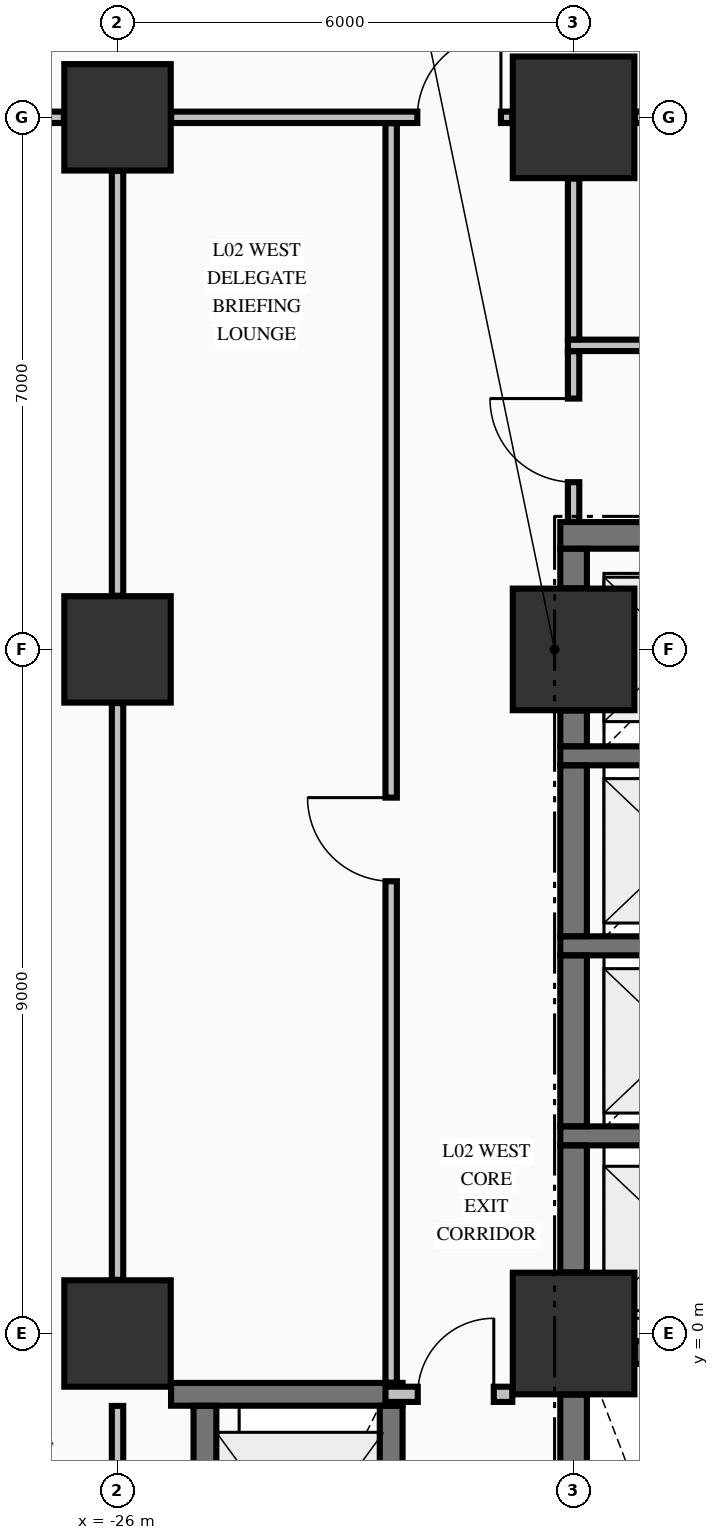
"""IFC4 building model, lengths in metres.
Left out: names, types, materials, properties, quantities, classifications, styles, units other than length and angle.
Written with IfcOpenShell. Run it as: python <this file> out.ifc"""

import sys

from ifc_helpers import new_model, si_unit, direction, frame, frame_2d, origin, origin_2d, place, context, subcontext, project, spatial, rectangle, extrude, element, fill, save


model = new_model("IFC4")
c1 = context("Model", 3, precision=1e-05, world=origin(), true_north=direction((0.0, 1.0)))
c2 = subcontext(c1, "Body", "Model", "MODEL_VIEW")
j1 = project(units=[si_unit("LENGTHUNIT", "METRE"), si_unit("PLANEANGLEUNIT", "RADIAN")], contexts=[c1])
p1 = place(None, origin())
s1 = spatial("IfcSite", under=j1, at=p1, CompositionType="ELEMENT")
p2 = place(p1, origin())
s2 = spatial("IfcBuilding", under=s1, at=p2, CompositionType="ELEMENT")
p3 = place(p2, frame((0.0, 0.0, 10.88)))
s3 = spatial("IfcBuildingStorey", under=s2, at=p3, CompositionType="ELEMENT", Elevation=10.88)
for number, where, z_axis, x_axis in (
    (1, (-26.0, 0.0, 0.0), (0.0, 0.0, 1.0), (1.0, 0.0, 0.0)),
    (2, (-26.0, 9.0, 0.0), (0.0, 0.0, 1.0), (1.0, 0.0, 0.0)),
    (3, (-26.0, 16.0, 0.0), (0.0, 0.0, 1.0), (1.0, 0.0, 0.0)),
):
    element("IfcColumn", number, at=place(p3, frame(where, z_axis=z_axis, x_axis=x_axis)), inside=s3, PredefinedType="COLUMN", context=c2, shape_type="SweptSolid", body=[
        extrude(rectangle(XDim=1.4, YDim=1.4, at=origin_2d()), origin(), (0.0, 0.0, 1.0), 5.09),
    ])
for number, where, z_axis, x_axis in (
    (4, (-20.0, 0.0, 0.0), (0.0, 0.0, 1.0), (1.0, 0.0, 0.0)),
    (5, (-20.0, 9.0, 0.0), (0.0, 0.0, 1.0), (1.0, 0.0, 0.0)),
    (6, (-20.0, 16.0, 0.0), (0.0, 0.0, 1.0), (1.0, 0.0, 0.0)),
):
    element("IfcColumn", number, at=place(p3, frame(where, z_axis=z_axis, x_axis=x_axis)), inside=s3, PredefinedType="COLUMN", context=c2, shape_type="SweptSolid", body=[
        extrude(rectangle(XDim=1.6, YDim=1.6, at=origin_2d()), origin(), (0.0, 0.0, 1.0), 5.09),
    ])
p4 = place(p3, frame((-25.296, -0.8, 0.0), z_axis=(0.0, 0.0, 1.0), x_axis=(1.0, 0.0, 0.0)))
e7 = element("IfcWall", 7, at=p4, inside=s3, PredefinedType="SHEAR", context=c2, shape_type="SweptSolid", body=[
    extrude(rectangle(XDim=3.046, YDim=0.3, at=frame_2d((1.523, 0.0))), origin(), (0.0, 0.0, 1.0), 5.09),
])
p5 = place(p3, frame((-19.196, -0.25, 0.0), z_axis=(0.0, 0.0, 1.0), x_axis=(1.0, 0.0, 0.0)))
e8 = element("IfcWall", 8, at=p5, inside=s3, PredefinedType="SHEAR", context=c2, shape_type="SweptSolid", body=[
    extrude(rectangle(XDim=7.392, YDim=0.3, at=frame_2d((3.696, 0.0))), origin(), (0.0, 0.0, 1.0), 5.09),
])
p6 = place(p5, frame((5.496, 0.0, 0.0)))
e9 = element("IfcOpeningElement", 9, at=p6, cuts=e8, PredefinedType="OPENING", context=c2, shape_type="SweptSolid", body=[
    extrude(rectangle(XDim=1.1, YDim=2.15, at=frame_2d((0.55, 1.075))), frame((0.0, 0.16, 0.0), z_axis=(0.0, -1.0, 0.0), x_axis=(1.0, 0.0, 0.0)), (0.0, 0.0, 1.0), 0.32),
])
for number, where, z_axis, x_axis in (
    (10, (-20.175, 2.6, 0.0), (0.0, 0.0, 1.0), (1.0, 0.0, 0.0)),
    (11, (-20.175, 5.1, 0.0), (0.0, 0.0, 1.0), (1.0, 0.0, 0.0)),
    (12, (-20.175, 7.6, 0.0), (0.0, 0.0, 1.0), (1.0, 0.0, 0.0)),
):
    element("IfcWall", number, at=place(p3, frame(where, z_axis=z_axis, x_axis=x_axis)), inside=s3, PredefinedType="SOLIDWALL", context=c2, shape_type="SweptSolid", body=[
        extrude(rectangle(XDim=3.1, YDim=0.25, at=frame_2d((1.55, 0.0))), origin(), (0.0, 0.0, 1.0), 5.09),
    ])
p7 = place(p3, frame((-20.175, 10.5, 0.0), z_axis=(0.0, 0.0, 1.0), x_axis=(1.0, 0.0, 0.0)))
e13 = element("IfcWall", 13, at=p7, inside=s3, PredefinedType="SHEAR", context=c2, shape_type="SweptSolid", body=[
    extrude(rectangle(XDim=5.475, YDim=0.35, at=frame_2d((2.738, 0.0))), origin(), (0.0, 0.0, 1.0), 5.09),
])
p8 = place(p7, frame((3.575, 0.0, 0.0)))
e14 = element("IfcOpeningElement", 14, at=p8, cuts=e13, PredefinedType="OPENING", context=c2, shape_type="SweptSolid", body=[
    extrude(rectangle(XDim=1.2, YDim=2.15, at=frame_2d((0.6, 1.075))), frame((0.0, 0.185, 0.0), z_axis=(0.0, -1.0, 0.0), x_axis=(1.0, 0.0, 0.0)), (0.0, 0.0, 1.0), 0.37),
])
p9 = place(p3, frame((-22.475, -0.8, 0.0), z_axis=(0.0, 0.0, 1.0), x_axis=(1.0, 0.0, 0.0)))
e15 = element("IfcWall", 15, at=p9, inside=s3, PredefinedType="PARTITIONING", context=c2, shape_type="SweptSolid", body=[
    extrude(rectangle(XDim=1.669, YDim=0.2, at=frame_2d((0.834, 0.0))), origin(), (0.0, 0.0, 1.0), 5.09),
])
p10 = place(p9, frame((0.425, 0.0, 0.0)))
e16 = element("IfcOpeningElement", 16, at=p10, cuts=e15, PredefinedType="OPENING", context=c2, shape_type="SweptSolid", body=[
    extrude(rectangle(XDim=1.0, YDim=2.15, at=frame_2d((0.5, 1.075))), frame((0.0, 0.11, 0.0), z_axis=(0.0, -1.0, 0.0), x_axis=(1.0, 0.0, 0.0)), (0.0, 0.0, 1.0), 0.22),
])
p11 = place(p3, frame((-20.075, 13.0, 0.0), z_axis=(0.0, 0.0, 1.0), x_axis=(1.0, 0.0, 0.0)))
e17 = element("IfcWall", 17, at=p11, inside=s3, PredefinedType="PARTITIONING", context=c2, shape_type="SweptSolid", body=[
    extrude(rectangle(XDim=11.415, YDim=0.15, at=frame_2d((5.708, 0.0))), origin(), (0.0, 0.0, 1.0), 5.09),
])
p12 = place(p11, frame((9.725, 0.0, 0.0)))
e18 = element("IfcOpeningElement", 18, at=p12, cuts=e17, PredefinedType="OPENING", context=c2, shape_type="SweptSolid", body=[
    extrude(rectangle(XDim=1.1, YDim=2.15, at=frame_2d((0.55, 1.075))), frame((0.0, 0.085, 0.0), z_axis=(0.0, -1.0, 0.0), x_axis=(1.0, 0.0, 0.0)), (0.0, 0.0, 1.0), 0.17),
])
p13 = place(p3, frame((-28.875, 16.0, 0.0), z_axis=(0.0, 0.0, 1.0), x_axis=(1.0, 0.0, 0.0)))
e19 = element("IfcWall", 19, at=p13, inside=s3, PredefinedType="PARTITIONING", context=c2, shape_type="SweptSolid", body=[
    extrude(rectangle(XDim=2.169, YDim=0.15, at=frame_2d((1.084, 0.0))), origin(), (0.0, 0.0, 1.0), 4.132),
])
p14 = place(p13, frame((0.6, 0.0, 0.0)))
e20 = element("IfcOpeningElement", 20, at=p14, cuts=e19, PredefinedType="OPENING", context=c2, shape_type="SweptSolid", body=[
    extrude(rectangle(XDim=1.05, YDim=2.15, at=frame_2d((0.525, 1.075))), frame((0.0, 0.085, 0.0), z_axis=(0.0, -1.0, 0.0), x_axis=(1.0, 0.0, 0.0)), (0.0, 0.0, 1.0), 0.17),
])
p15 = place(p3, frame((-25.294, 16.0, 0.0), z_axis=(0.0, 0.0, 1.0), x_axis=(1.0, 0.0, 0.0)))
e21 = element("IfcWall", 21, at=p15, inside=s3, PredefinedType="PARTITIONING", context=c2, shape_type="SweptSolid", body=[
    extrude(rectangle(XDim=4.488, YDim=0.15, at=frame_2d((2.244, 0.0))), origin(), (0.0, 0.0, 1.0), 4.132),
])
p16 = place(p15, frame((3.238, 0.0, 0.0)))
e22 = element("IfcOpeningElement", 22, at=p16, cuts=e21, PredefinedType="OPENING", context=c2, shape_type="SweptSolid", body=[
    extrude(rectangle(XDim=1.1, YDim=2.15, at=frame_2d((0.55, 1.075))), frame((0.0, 0.085, 0.0), z_axis=(0.0, -1.0, 0.0), x_axis=(1.0, 0.0, 0.0)), (0.0, 0.0, 1.0), 0.17),
])
p17 = place(p3, frame((-19.194, 16.0, 0.0), z_axis=(0.0, 0.0, 1.0), x_axis=(1.0, 0.0, 0.0)))
e23 = element("IfcWall", 23, at=p17, inside=s3, PredefinedType="PARTITIONING", context=c2, shape_type="SweptSolid", body=[
    extrude(rectangle(XDim=7.388, YDim=0.15, at=frame_2d((3.694, 0.0))), origin(), (0.0, 0.0, 1.0), 4.132),
])
p18 = place(p17, frame((3.144, 0.0, 0.0)))
e24 = element("IfcOpeningElement", 24, at=p18, cuts=e23, PredefinedType="OPENING", context=c2, shape_type="SweptSolid", body=[
    extrude(rectangle(XDim=1.1, YDim=2.15, at=frame_2d((0.55, 1.075))), frame((0.0, 0.085, 0.0), z_axis=(0.0, -1.0, 0.0), x_axis=(1.0, 0.0, 0.0)), (0.0, 0.0, 1.0), 0.17),
])
p19 = place(p3, frame((-24.85, -4.648, 0.0), z_axis=(0.0, 0.0, 1.0), x_axis=(0.0, 1.0, 0.0)))
e25 = element("IfcWall", 25, at=p19, inside=s3, PredefinedType="SHEAR", context=c2, shape_type="SweptSolid", body=[
    extrude(rectangle(XDim=3.696, YDim=0.3, at=frame_2d((1.848, 0.0))), origin(), (0.0, 0.0, 1.0), 5.09),
])
p20 = place(p3, frame((-22.4, -4.648, 0.0), z_axis=(0.0, 0.0, 1.0), x_axis=(0.0, 1.0, 0.0)))
e26 = element("IfcWall", 26, at=p20, inside=s3, PredefinedType="SHEAR", context=c2, shape_type="SweptSolid", body=[
    extrude(rectangle(XDim=3.696, YDim=0.3, at=frame_2d((1.848, 0.0))), origin(), (0.0, 0.0, 1.0), 5.09),
])
p21 = place(p20, frame((1.198, 0.0, 0.0)))
e27 = element("IfcOpeningElement", 27, at=p21, cuts=e26, PredefinedType="OPENING", context=c2, shape_type="SweptSolid", body=[
    extrude(rectangle(XDim=1.3, YDim=2.3, at=frame_2d((0.65, 1.15))), frame((0.0, 0.16, 0.0), z_axis=(0.0, -1.0, 0.0), x_axis=(1.0, 0.0, 0.0)), (0.0, 0.0, 1.0), 0.32),
])
p22 = place(p3, frame((-20.0, -8.196, 0.0), z_axis=(0.0, 0.0, 1.0), x_axis=(0.0, 1.0, 0.0)))
e28 = element("IfcWall", 28, at=p22, inside=s3, PredefinedType="SHEAR", context=c2, shape_type="SweptSolid", body=[
    extrude(rectangle(XDim=7.392, YDim=0.35, at=frame_2d((3.696, 0.0))), origin(), (0.0, 0.0, 1.0), 5.09),
])
p23 = place(p3, frame((-20.0, 0.804, 0.0), z_axis=(0.0, 0.0, 1.0), x_axis=(0.0, 1.0, 0.0)))
e29 = element("IfcWall", 29, at=p23, inside=s3, PredefinedType="SHEAR", context=c2, shape_type="SweptSolid", body=[
    extrude(rectangle(XDim=1.669, YDim=0.35, at=frame_2d((0.834, 0.0))), origin(), (0.0, 0.0, 1.0), 5.09),
])
for number, where, z_axis, x_axis in (
    (30, (-20.0, 2.727, 0.0), (0.0, 0.0, 1.0), (0.0, 1.0, 0.0)),
    (31, (-20.0, 5.227, 0.0), (0.0, 0.0, 1.0), (0.0, 1.0, 0.0)),
):
    element("IfcWall", number, at=place(p3, frame(where, z_axis=z_axis, x_axis=x_axis)), inside=s3, PredefinedType="SHEAR", context=c2, shape_type="SweptSolid", body=[
        extrude(rectangle(XDim=2.246, YDim=0.35, at=frame_2d((1.123, 0.0))), origin(), (0.0, 0.0, 1.0), 5.09),
    ])
p24 = place(p3, frame((-20.0, 7.727, 0.0), z_axis=(0.0, 0.0, 1.0), x_axis=(0.0, 1.0, 0.0)))
e32 = element("IfcWall", 32, at=p24, inside=s3, PredefinedType="SHEAR", context=c2, shape_type="SweptSolid", body=[
    extrude(rectangle(XDim=0.469, YDim=0.35, at=frame_2d((0.234, 0.0))), origin(), (0.0, 0.0, 1.0), 5.09),
])
p25 = place(p3, frame((-20.0, 9.804, 0.0), z_axis=(0.0, 0.0, 1.0), x_axis=(0.0, 1.0, 0.0)))
e33 = element("IfcWall", 33, at=p25, inside=s3, PredefinedType="SHEAR", context=c2, shape_type="SweptSolid", body=[
    extrude(rectangle(XDim=0.519, YDim=0.35, at=frame_2d((0.26, 0.0))), origin(), (0.0, 0.0, 1.0), 5.09),
])
p26 = place(p3, frame((-26.0, -8.294, 0.0), z_axis=(0.0, 0.0, 1.0), x_axis=(0.0, 1.0, 0.0)))
e34 = element("IfcWall", 34, at=p26, inside=s3, PredefinedType="PARTITIONING", context=c2, shape_type="SweptSolid", body=[
    extrude(rectangle(XDim=7.341, YDim=0.15, at=frame_2d((3.67, 0.0))), origin(), (0.0, 0.0, 1.0), 4.132),
])
p27 = place(p3, frame((-26.0, 0.706, 0.0), z_axis=(0.0, 0.0, 1.0), x_axis=(0.0, 1.0, 0.0)))
e35 = element("IfcWall", 35, at=p27, inside=s3, PredefinedType="PARTITIONING", context=c2, shape_type="SweptSolid", body=[
    extrude(rectangle(XDim=7.588, YDim=0.15, at=frame_2d((3.794, 0.0))), origin(), (0.0, 0.0, 1.0), 4.132),
])
p28 = place(p3, frame((-26.0, 9.706, 0.0), z_axis=(0.0, 0.0, 1.0), x_axis=(0.0, 1.0, 0.0)))
e36 = element("IfcWall", 36, at=p28, inside=s3, PredefinedType="PARTITIONING", context=c2, shape_type="SweptSolid", body=[
    extrude(rectangle(XDim=5.588, YDim=0.15, at=frame_2d((2.794, 0.0))), origin(), (0.0, 0.0, 1.0), 4.132),
])
p29 = place(p3, frame((-22.4, -0.647, 0.0), z_axis=(0.0, 0.0, 1.0), x_axis=(0.0, 1.0, 0.0)))
e37 = element("IfcWall", 37, at=p29, inside=s3, PredefinedType="PARTITIONING", context=c2, shape_type="SweptSolid", body=[
    extrude(rectangle(XDim=16.569, YDim=0.15, at=frame_2d((8.285, 0.0))), origin(), (0.0, 0.0, 1.0), 5.09),
])
p30 = place(p29, frame((6.597, 0.0, 0.0)))
e38 = element("IfcOpeningElement", 38, at=p30, cuts=e37, PredefinedType="OPENING", context=c2, shape_type="SweptSolid", body=[
    extrude(rectangle(XDim=1.1, YDim=2.15, at=frame_2d((0.55, 1.075))), frame((0.0, 0.085, 0.0), z_axis=(0.0, -1.0, 0.0), x_axis=(1.0, 0.0, 0.0)), (0.0, 0.0, 1.0), 0.17),
])
p31 = place(p3, frame((-20.0, 10.678, 0.0), z_axis=(0.0, 0.0, 1.0), x_axis=(0.0, 1.0, 0.0)))
e39 = element("IfcWall", 39, at=p31, inside=s3, PredefinedType="PARTITIONING", context=c2, shape_type="SweptSolid", body=[
    extrude(rectangle(XDim=2.244, YDim=0.15, at=frame_2d((1.122, 0.0))), origin(), (0.0, 0.0, 1.0), 4.132),
])
p32 = place(p31, frame((0.522, 0.0, 0.0)))
e40 = element("IfcOpeningElement", 40, at=p32, cuts=e39, PredefinedType="OPENING", context=c2, shape_type="SweptSolid", body=[
    extrude(rectangle(XDim=1.1, YDim=2.15, at=frame_2d((0.55, 1.075))), frame((0.0, 0.085, 0.0), z_axis=(0.0, -1.0, 0.0), x_axis=(1.0, 0.0, 0.0)), (0.0, 0.0, 1.0), 0.17),
])
p33 = place(p3, frame((-20.0, 13.078, 0.0), z_axis=(0.0, 0.0, 1.0), x_axis=(0.0, 1.0, 0.0)))
e41 = element("IfcWall", 41, at=p33, inside=s3, PredefinedType="PARTITIONING", context=c2, shape_type="SweptSolid", body=[
    extrude(rectangle(XDim=2.116, YDim=0.15, at=frame_2d((1.058, 0.0))), origin(), (0.0, 0.0, 1.0), 4.132),
])
p34 = place(p10, origin())
e42 = element("IfcDoor", 42, at=p34, inside=s3, OperationType="SINGLE_SWING_RIGHT", PredefinedType="DOOR", context=c2, shape_type="SweptSolid", body=[
    extrude(rectangle(XDim=1.0, YDim=2.15, at=frame_2d((0.5, 1.075))), frame((0.0, 0.025, 0.0), z_axis=(0.0, -1.0, 0.0), x_axis=(1.0, 0.0, 0.0)), (0.0, 0.0, 1.0), 0.05),
])
fill(e16, e42)
p35 = place(p30, origin())
e43 = element("IfcDoor", 43, at=p35, inside=s3, OperationType="SINGLE_SWING_RIGHT", PredefinedType="DOOR", context=c2, shape_type="SweptSolid", body=[
    extrude(rectangle(XDim=1.1, YDim=2.15, at=frame_2d((0.55, 1.075))), frame((0.0, 0.025, 0.0), z_axis=(0.0, -1.0, 0.0), x_axis=(1.0, 0.0, 0.0)), (0.0, 0.0, 1.0), 0.05),
])
fill(e38, e43)
p36 = place(p16, origin())
e44 = element("IfcDoor", 44, at=p36, inside=s3, OperationType="SINGLE_SWING_RIGHT", PredefinedType="DOOR", context=c2, shape_type="SweptSolid", body=[
    extrude(rectangle(XDim=1.1, YDim=2.15, at=frame_2d((0.55, 1.075))), frame((0.0, 0.025, 0.0), z_axis=(0.0, -1.0, 0.0), x_axis=(1.0, 0.0, 0.0)), (0.0, 0.0, 1.0), 0.05),
])
fill(e22, e44)
p37 = place(p32, origin())
e45 = element("IfcDoor", 45, at=p37, inside=s3, OperationType="SINGLE_SWING_RIGHT", PredefinedType="DOOR", context=c2, shape_type="SweptSolid", body=[
    extrude(rectangle(XDim=1.1, YDim=2.15, at=frame_2d((0.55, 1.075))), frame((0.0, 0.025, 0.0), z_axis=(0.0, -1.0, 0.0), x_axis=(1.0, 0.0, 0.0)), (0.0, 0.0, 1.0), 0.05),
])
fill(e40, e45)
save(model, sys.argv[1])
